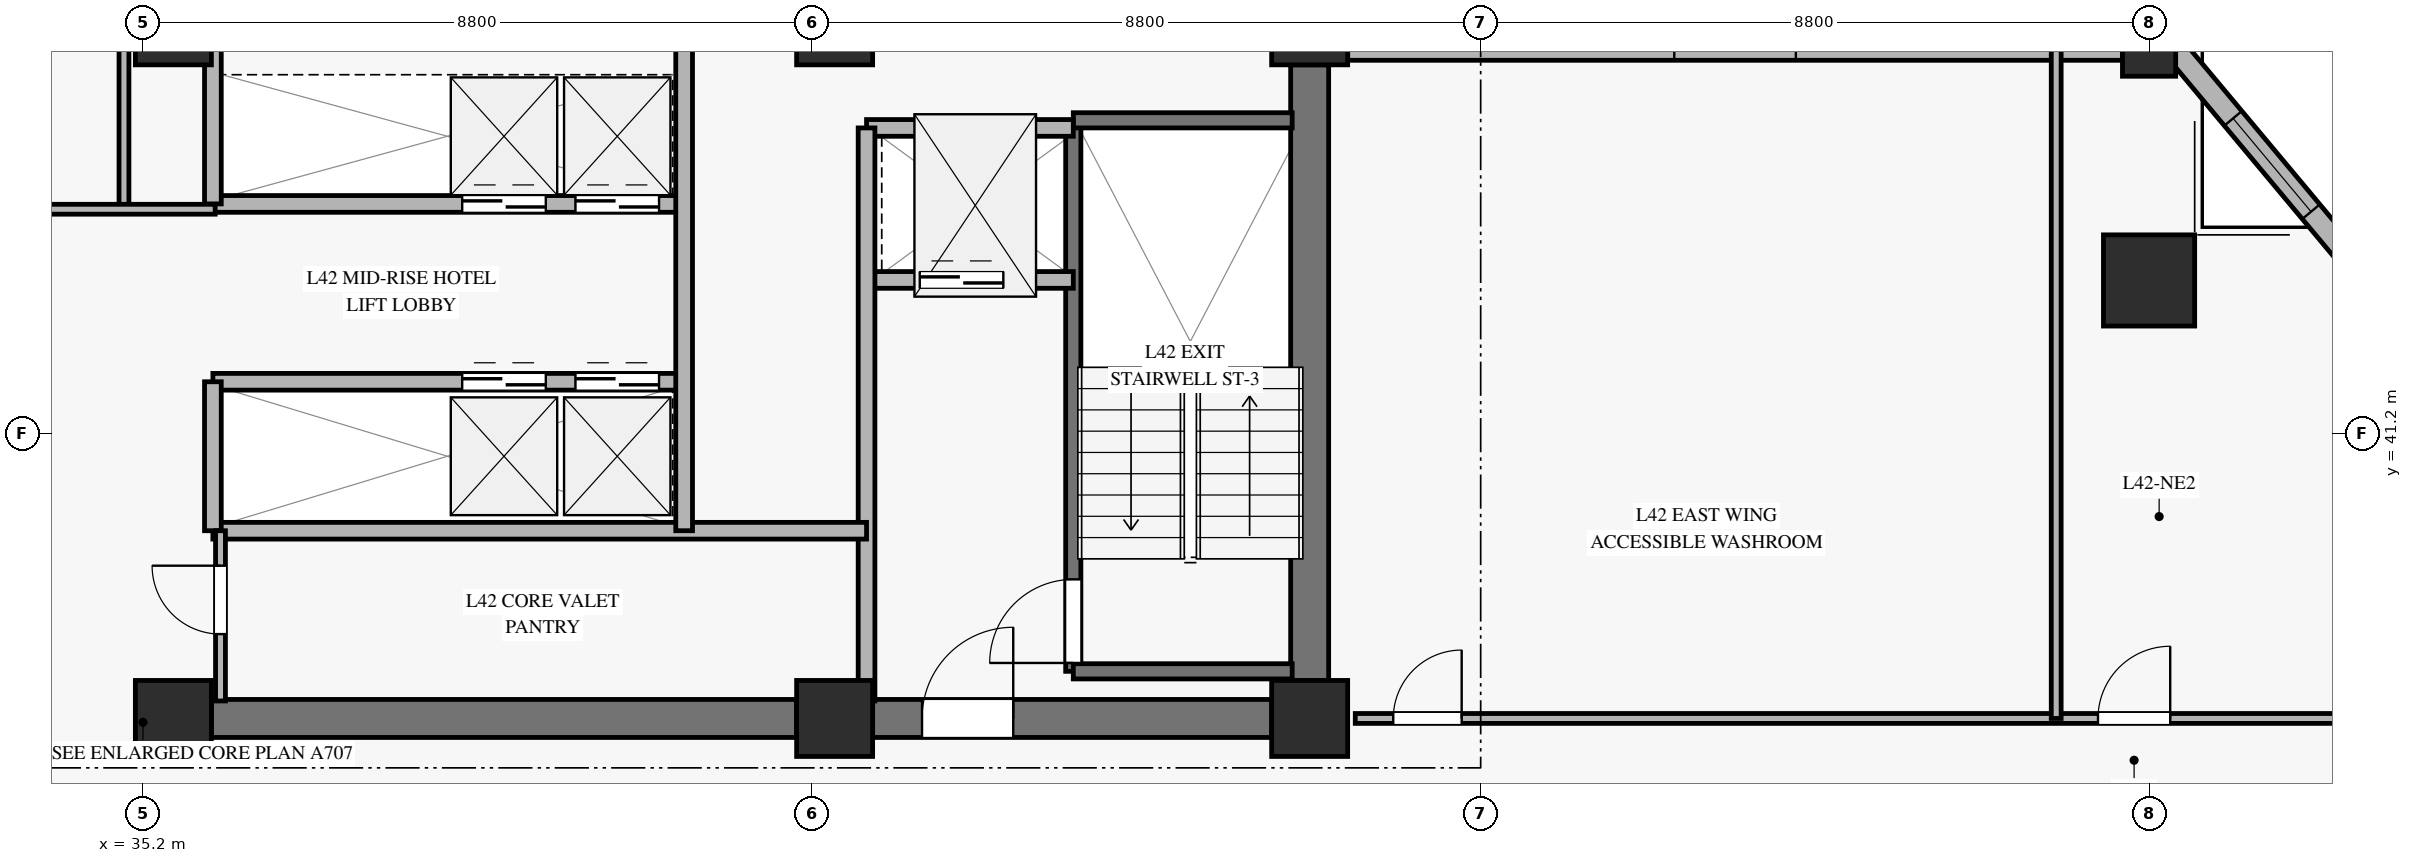
"""IFC4 building model, lengths in metres.
Left out: names, types, materials, properties, quantities, classifications, styles, units other than length and angle.
Written with IfcOpenShell. Run it as: python <this file> out.ifc"""

import sys

from ifc_helpers import new_model, si_unit, direction, frame, frame_2d, origin, origin_2d, place, context, subcontext, project, spatial, rectangle, hollow_rectangle, extrude, source, transform, mapped, element, fill, save


model = new_model("IFC4")
c1 = context("Model", 3, precision=1e-05, world=origin(), true_north=direction((0.0, 1.0)))
c2 = subcontext(c1, "Body", "Model", "MODEL_VIEW")
j1 = project(units=[si_unit("LENGTHUNIT", "METRE"), si_unit("PLANEANGLEUNIT", "RADIAN")], contexts=[c1])
p1 = place(None, origin())
s1 = spatial("IfcSite", under=j1, at=p1, CompositionType="ELEMENT")
p2 = place(p1, origin())
s2 = spatial("IfcBuilding", under=s1, at=p2, CompositionType="ELEMENT")
p3 = place(p2, frame((0.0, 0.0, 170.2)))
s3 = spatial("IfcBuildingStorey", under=s2, at=p3, CompositionType="ELEMENT", Elevation=170.2)
m1 = source(origin(), c2, "Body", "SweptSolid", [
    extrude(rectangle(XDim=1.0, YDim=1.0, at=origin_2d()), origin(), (0.0, 0.0, 1.0), 3.27),
])
for number, where, z_axis, x_axis in (
    (1, (35.6, 37.45, 0.0), (0.0, 0.0, 1.0), (1.0, 0.0, 0.0)),
    (2, (35.6, 46.55, 0.0), (0.0, 0.0, 1.0), (1.0, 0.0, 0.0)),
    (3, (44.3, 37.45, 0.0), (0.0, 0.0, 1.0), (1.0, 0.0, 0.0)),
    (4, (44.3, 46.55, 0.0), (0.0, 0.0, 1.0), (1.0, 0.0, 0.0)),
    (5, (50.55, 37.45, 0.0), (0.0, 0.0, 1.0), (1.0, 0.0, 0.0)),
    (6, (50.55, 46.55, 0.0), (0.0, 0.0, 1.0), (1.0, 0.0, 0.0)),
):
    element("IfcColumn", number, at=place(p3, frame(where, z_axis=z_axis, x_axis=x_axis)), inside=s3, PredefinedType="PILASTER", context=c2, shape_type="MappedRepresentation", body=[
        mapped(m1, transform((0.0, 0.0, 0.0), x_axis=(1.0, 0.0, 0.0), y_axis=(0.0, 1.0, 0.0), z_axis=(0.0, 0.0, 1.0), scale=1.0)),
    ])
p4 = place(p3, frame((36.1, 37.45, 0.0), z_axis=(0.0, 0.0, 1.0), x_axis=(1.0, 0.0, 0.0)))
e7 = element("IfcWall", 7, at=p4, inside=s3, PredefinedType="SHEAR", context=c2, shape_type="SweptSolid", body=[
    extrude(rectangle(XDim=7.7, YDim=0.5, at=frame_2d((3.85, 0.0))), origin(), (0.0, 0.0, 1.0), 3.27),
])
p5 = place(p3, frame((44.8, 37.45, 0.0), z_axis=(0.0, 0.0, 1.0), x_axis=(1.0, 0.0, 0.0)))
e8 = element("IfcWall", 8, at=p5, inside=s3, PredefinedType="SHEAR", context=c2, shape_type="SweptSolid", body=[
    extrude(rectangle(XDim=5.25, YDim=0.5, at=frame_2d((2.625, 0.0))), origin(), (0.0, 0.0, 1.0), 3.27),
])
p6 = place(p5, frame((0.65, 0.0, 0.0)))
e9 = element("IfcOpeningElement", 9, at=p6, cuts=e8, PredefinedType="OPENING", context=c2, shape_type="SweptSolid", body=[
    extrude(rectangle(XDim=1.2, YDim=2.15, at=frame_2d((0.6, 1.075))), frame((0.0, 0.26, 0.0), z_axis=(0.0, -1.0, 0.0), x_axis=(1.0, 0.0, 0.0)), (0.0, 0.0, 1.0), 0.52),
])
p7 = place(p3, frame((50.55, 37.95, 0.0), z_axis=(0.0, 0.0, 1.0), x_axis=(0.0, 1.0, 0.0)))
e10 = element("IfcWall", 10, at=p7, inside=s3, PredefinedType="SHEAR", context=c2, shape_type="SweptSolid", body=[
    extrude(rectangle(XDim=8.1, YDim=0.5, at=frame_2d((4.05, 0.0))), origin(), (0.0, 0.0, 1.0), 3.27),
])
m2 = source(origin(), c2, "Body", "SweptSolid", [
    extrude(hollow_rectangle(XDim=1.2, YDim=1.2, WallThickness=0.055, at=origin_2d()), origin(), (0.0, 0.0, 1.0), 3.27),
])
p8 = place(p3, frame((61.594, 43.213, 0.0), z_axis=(0.0, 0.0, 1.0), x_axis=(1.0, 0.0, 0.0)))
e11 = element("IfcColumn", 11, at=p8, inside=s3, PredefinedType="COLUMN", context=c2, shape_type="MappedRepresentation", body=[
    mapped(m2, transform((0.0, 0.0, 0.0), x_axis=(1.0, 0.0, 0.0), y_axis=(0.0, 1.0, 0.0), z_axis=(0.0, 0.0, 1.0), scale=1.0)),
])
m3 = source(origin(), c2, "Body", "SweptSolid", [
    extrude(hollow_rectangle(XDim=0.7, YDim=0.7, WallThickness=0.032, at=origin_2d()), origin(), (0.0, 0.0, 1.0), 3.27),
])
p9 = place(p3, frame((61.594, 46.25, 0.0), z_axis=(0.0, 0.0, 1.0), x_axis=(1.0, 0.0, 0.0)))
e12 = element("IfcColumn", 12, at=p9, inside=s3, PredefinedType="COLUMN", context=c2, shape_type="MappedRepresentation", body=[
    mapped(m3, transform((0.0, 0.0, 0.0), x_axis=(1.0, 0.0, 0.0), y_axis=(0.0, 1.0, 0.0), z_axis=(0.0, 0.0, 1.0), scale=1.0)),
])
p10 = place(p3, frame((51.05, 46.25, 0.0), z_axis=(0.0, 0.0, 1.0), x_axis=(1.0, 0.0, 0.0)))
e13 = element("IfcWall", 13, at=p10, inside=s3, PredefinedType="SOLIDWALL", context=c2, shape_type="SweptSolid", body=[
    extrude(rectangle(XDim=10.194, YDim=0.28, at=frame_2d((5.097, 0.0))), origin(), (0.0, 0.0, 1.0), 2.75),
])
p11 = place(p10, frame((4.297, 0.0, 0.45)))
e14 = element("IfcOpeningElement", 14, at=p11, cuts=e13, PredefinedType="OPENING", context=c2, shape_type="SweptSolid", body=[
    extrude(rectangle(XDim=1.6, YDim=2.0, at=frame_2d((0.8, 1.0))), frame((0.0, 0.15, 0.0), z_axis=(0.0, -1.0, 0.0), x_axis=(1.0, 0.0, 0.0)), (0.0, 0.0, 1.0), 0.3),
])
p12 = place(p3, frame((64.481, 43.213, 0.0), z_axis=(0.0, 0.0, 1.0), x_axis=(-0.641069950716, 0.767482454711, 0.0)))
e15 = element("IfcWall", 15, at=p12, inside=s3, PredefinedType="SOLIDWALL", context=c2, shape_type="SweptSolid", body=[
    extrude(rectangle(XDim=3.957, YDim=0.3, at=frame_2d((1.979, 0.0))), origin(), (0.0, 0.0, 1.0), 2.75),
])
p13 = place(p12, frame((1.179, 0.0, 0.45)))
e16 = element("IfcOpeningElement", 16, at=p13, cuts=e15, PredefinedType="OPENING", context=c2, shape_type="SweptSolid", body=[
    extrude(rectangle(XDim=1.6, YDim=2.0, at=frame_2d((0.8, 1.0))), frame((0.0, 0.16, 0.0), z_axis=(0.0, -1.0, 0.0), x_axis=(1.0, 0.0, 0.0)), (0.0, 0.0, 1.0), 0.32),
])
p14 = place(p3, frame((47.44, 38.07, 0.0), z_axis=(0.0, 0.0, 1.0), x_axis=(0.0, 1.0, 0.0)))
e17 = element("IfcWall", 17, at=p14, inside=s3, PredefinedType="SOLIDWALL", context=c2, shape_type="SweptSolid", body=[
    extrude(rectangle(XDim=7.25, YDim=0.2, at=frame_2d((3.625, 0.0))), origin(), (0.0, 0.0, 1.0), 3.5),
])
p15 = place(p14, frame((0.11, 0.0, 0.0)))
e18 = element("IfcOpeningElement", 18, at=p15, cuts=e17, PredefinedType="OPENING", context=c2, shape_type="SweptSolid", body=[
    extrude(rectangle(XDim=1.1, YDim=2.15, at=frame_2d((0.55, 1.075))), frame((0.0, 0.11, 0.0), z_axis=(0.0, -1.0, 0.0), x_axis=(1.0, 0.0, 0.0)), (0.0, 0.0, 1.0), 0.22),
])
for number, where, z_axis, x_axis in (
    (19, (47.44, 45.32, 0.0), (0.0, 0.0, 1.0), (1.0, 0.0, 0.0)),
    (20, (47.44, 38.07, 0.0), (0.0, 0.0, 1.0), (1.0, 0.0, 0.0)),
):
    element("IfcWall", number, at=place(p3, frame(where, z_axis=z_axis, x_axis=x_axis)), inside=s3, PredefinedType="SOLIDWALL", context=c2, shape_type="SweptSolid", body=[
        extrude(rectangle(XDim=2.88, YDim=0.2, at=frame_2d((1.44, 0.0))), origin(), (0.0, 0.0, 1.0), 3.5),
    ])
p16 = place(p3, frame((44.72, 43.22, 0.0), z_axis=(0.0, 0.0, 1.0), x_axis=(1.0, 0.0, 0.0)))
e21 = element("IfcWall", 21, at=p16, inside=s3, PredefinedType="SOLIDWALL", context=c2, shape_type="SweptSolid", body=[
    extrude(rectangle(XDim=2.72, YDim=0.22, at=frame_2d((1.36, 0.0))), origin(), (0.0, 0.0, 1.0), 3.27),
])
p17 = place(p16, frame((0.7, 0.0, 0.0)))
e22 = element("IfcOpeningElement", 22, at=p17, cuts=e21, PredefinedType="OPENING", context=c2, shape_type="SweptSolid", body=[
    extrude(rectangle(XDim=1.1, YDim=2.2, at=frame_2d((0.55, 1.1))), frame((0.0, 0.12, 0.0), z_axis=(0.0, -1.0, 0.0), x_axis=(1.0, 0.0, 0.0)), (0.0, 0.0, 1.0), 0.24),
])
p18 = place(p3, frame((44.72, 45.22, 0.0), z_axis=(0.0, 0.0, 1.0), x_axis=(1.0, 0.0, 0.0)))
e23 = element("IfcWall", 23, at=p18, inside=s3, PredefinedType="SOLIDWALL", context=c2, shape_type="SweptSolid", body=[
    extrude(rectangle(XDim=2.72, YDim=0.22, at=frame_2d((1.36, 0.0))), origin(), (0.0, 0.0, 1.0), 3.27),
])
p19 = place(p3, frame((44.72, 37.68, 0.0), z_axis=(0.0, 0.0, 1.0), x_axis=(0.0, 1.0, 0.0)))
e24 = element("IfcWall", 24, at=p19, inside=s3, PredefinedType="SOLIDWALL", context=c2, shape_type="SweptSolid", body=[
    extrude(rectangle(XDim=7.54, YDim=0.22, at=frame_2d((3.77, 0.0))), origin(), (0.0, 0.0, 1.0), 3.27),
])
p20 = place(p3, frame((36.12, 44.22, 0.0), z_axis=(0.0, 0.0, 1.0), x_axis=(1.0, 0.0, 0.0)))
e25 = element("IfcWall", 25, at=p20, inside=s3, PredefinedType="SOLIDWALL", context=c2, shape_type="SweptSolid", body=[
    extrude(rectangle(XDim=6.2, YDim=0.22, at=frame_2d((3.1, 0.0))), origin(), (0.0, 0.0, 1.0), 3.27),
])
p21 = place(p20, frame((3.28, 0.0, 0.0)))
e26 = element("IfcOpeningElement", 26, at=p21, cuts=e25, PredefinedType="OPENING", context=c2, shape_type="SweptSolid", body=[
    extrude(rectangle(XDim=1.1, YDim=2.2, at=frame_2d((0.55, 1.1))), frame((0.0, 0.12, 0.0), z_axis=(0.0, -1.0, 0.0), x_axis=(1.0, 0.0, 0.0)), (0.0, 0.0, 1.0), 0.24),
])
p22 = place(p20, frame((4.77, 0.0, 0.0)))
e27 = element("IfcOpeningElement", 27, at=p22, cuts=e25, PredefinedType="OPENING", context=c2, shape_type="SweptSolid", body=[
    extrude(rectangle(XDim=1.1, YDim=2.2, at=frame_2d((0.55, 1.1))), frame((0.0, 0.12, 0.0), z_axis=(0.0, -1.0, 0.0), x_axis=(1.0, 0.0, 0.0)), (0.0, 0.0, 1.0), 0.24),
])
p23 = place(p3, frame((36.12, 41.88, 0.0), z_axis=(0.0, 0.0, 1.0), x_axis=(1.0, 0.0, 0.0)))
e28 = element("IfcWall", 28, at=p23, inside=s3, PredefinedType="SOLIDWALL", context=c2, shape_type="SweptSolid", body=[
    extrude(rectangle(XDim=6.2, YDim=0.22, at=frame_2d((3.1, 0.0))), origin(), (0.0, 0.0, 1.0), 3.27),
])
p24 = place(p23, frame((3.28, 0.0, 0.0)))
e29 = element("IfcOpeningElement", 29, at=p24, cuts=e28, PredefinedType="OPENING", context=c2, shape_type="SweptSolid", body=[
    extrude(rectangle(XDim=1.1, YDim=2.2, at=frame_2d((0.55, 1.1))), frame((0.0, 0.12, 0.0), z_axis=(0.0, -1.0, 0.0), x_axis=(1.0, 0.0, 0.0)), (0.0, 0.0, 1.0), 0.24),
])
p25 = place(p23, frame((4.77, 0.0, 0.0)))
e30 = element("IfcOpeningElement", 30, at=p25, cuts=e28, PredefinedType="OPENING", context=c2, shape_type="SweptSolid", body=[
    extrude(rectangle(XDim=1.1, YDim=2.2, at=frame_2d((0.55, 1.1))), frame((0.0, 0.12, 0.0), z_axis=(0.0, -1.0, 0.0), x_axis=(1.0, 0.0, 0.0)), (0.0, 0.0, 1.0), 0.24),
])
p26 = place(p3, frame((36.12, 39.92, 0.0), z_axis=(0.0, 0.0, 1.0), x_axis=(1.0, 0.0, 0.0)))
e31 = element("IfcWall", 31, at=p26, inside=s3, PredefinedType="SOLIDWALL", context=c2, shape_type="SweptSolid", body=[
    extrude(rectangle(XDim=8.6, YDim=0.22, at=frame_2d((4.3, 0.0))), origin(), (0.0, 0.0, 1.0), 2.555),
])
p27 = place(p3, frame((42.32, 39.92, 0.0), z_axis=(0.0, 0.0, 1.0), x_axis=(0.0, 1.0, 0.0)))
e32 = element("IfcWall", 32, at=p27, inside=s3, PredefinedType="SOLIDWALL", context=c2, shape_type="SweptSolid", body=[
    extrude(rectangle(XDim=6.4, YDim=0.22, at=frame_2d((3.2, 0.0))), origin(), (0.0, 0.0, 1.0), 3.27),
])
p28 = place(p3, frame((36.12, 39.92, 0.0), z_axis=(0.0, 0.0, 1.0), x_axis=(0.0, 1.0, 0.0)))
e33 = element("IfcWall", 33, at=p28, inside=s3, PredefinedType="SOLIDWALL", context=c2, shape_type="SweptSolid", body=[
    extrude(rectangle(XDim=1.96, YDim=0.22, at=frame_2d((0.98, 0.0))), origin(), (0.0, 0.0, 1.0), 3.27),
])
p29 = place(p3, frame((36.12, 44.22, 0.0), z_axis=(0.0, 0.0, 1.0), x_axis=(0.0, 1.0, 0.0)))
e34 = element("IfcWall", 34, at=p29, inside=s3, PredefinedType="SOLIDWALL", context=c2, shape_type="SweptSolid", body=[
    extrude(rectangle(XDim=2.1, YDim=0.22, at=frame_2d((1.05, 0.0))), origin(), (0.0, 0.0, 1.0), 3.27),
])
p30 = place(p3, frame((34.95, 44.15, 0.0), z_axis=(0.0, 0.0, 1.0), x_axis=(0.0, 1.0, 0.0)))
e35 = element("IfcWall", 35, at=p30, inside=s3, PredefinedType="PARTITIONING", context=c2, shape_type="SweptSolid", body=[
    extrude(rectangle(XDim=2.17, YDim=0.13, at=frame_2d((1.085, 0.0))), origin(), (0.0, 0.0, 1.0), 3.27),
])
p31 = place(p3, frame((33.18, 44.15, 0.0), z_axis=(0.0, 0.0, 1.0), x_axis=(1.0, 0.0, 0.0)))
e36 = element("IfcWall", 36, at=p31, inside=s3, PredefinedType="PARTITIONING", context=c2, shape_type="SweptSolid", body=[
    extrude(rectangle(XDim=2.97, YDim=0.13, at=frame_2d((1.485, 0.0))), origin(), (0.0, 0.0, 1.0), 2.555),
])
p32 = place(p3, frame((36.22, 37.68, 0.0), z_axis=(0.0, 0.0, 1.0), x_axis=(0.0, 1.0, 0.0)))
e37 = element("IfcWall", 37, at=p32, inside=s3, PredefinedType="PARTITIONING", context=c2, shape_type="SweptSolid", body=[
    extrude(rectangle(XDim=2.24, YDim=0.13, at=frame_2d((1.12, 0.0))), origin(), (0.0, 0.0, 1.0), 3.27),
])
p33 = place(p32, frame((0.88, 0.0, 0.0)))
e38 = element("IfcOpeningElement", 38, at=p33, cuts=e37, PredefinedType="OPENING", context=c2, shape_type="SweptSolid", body=[
    extrude(rectangle(XDim=0.9, YDim=2.1, at=frame_2d((0.45, 1.05))), frame((0.0, 0.075, 0.0), z_axis=(0.0, -1.0, 0.0), x_axis=(1.0, 0.0, 0.0)), (0.0, 0.0, 1.0), 0.15),
])
p34 = place(p3, frame((51.15, 37.45, 0.0), z_axis=(0.0, 0.0, 1.0), x_axis=(1.0, 0.0, 0.0)))
e39 = element("IfcWall", 39, at=p34, inside=s3, PredefinedType="PARTITIONING", context=c2, shape_type="SweptSolid", body=[
    extrude(rectangle(XDim=13.331, YDim=0.13, at=frame_2d((6.666, 0.0))), origin(), (0.0, 0.0, 1.0), 2.755),
])
p35 = place(p34, frame((0.5, 0.0, 0.0)))
e40 = element("IfcOpeningElement", 40, at=p35, cuts=e39, PredefinedType="OPENING", context=c2, shape_type="SweptSolid", body=[
    extrude(rectangle(XDim=0.9, YDim=2.1, at=frame_2d((0.45, 1.05))), frame((0.0, 0.075, 0.0), z_axis=(0.0, -1.0, 0.0), x_axis=(1.0, 0.0, 0.0)), (0.0, 0.0, 1.0), 0.15),
])
p36 = place(p34, frame((9.772, 0.0, 0.0)))
e41 = element("IfcOpeningElement", 41, at=p36, cuts=e39, PredefinedType="OPENING", context=c2, shape_type="SweptSolid", body=[
    extrude(rectangle(XDim=0.95, YDim=2.1, at=frame_2d((0.475, 1.05))), frame((0.0, 0.075, 0.0), z_axis=(0.0, -1.0, 0.0), x_axis=(1.0, 0.0, 0.0)), (0.0, 0.0, 1.0), 0.15),
])
p37 = place(p3, frame((60.372, 37.45, 0.0), z_axis=(0.0, 0.0, 1.0), x_axis=(0.0, 1.0, 0.0)))
e42 = element("IfcWall", 42, at=p37, inside=s3, PredefinedType="PARTITIONING", context=c2, shape_type="SweptSolid", body=[
    extrude(rectangle(XDim=8.8, YDim=0.13, at=frame_2d((4.4, 0.0))), origin(), (0.0, 0.0, 1.0), 3.27),
])
m4 = source(origin(), c2, "Body", "SweptSolid", [
    extrude(rectangle(XDim=1.6, YDim=2.0, at=frame_2d((0.8, 1.0))), frame((0.0, 0.03, 0.0), z_axis=(0.0, -1.0, 0.0), x_axis=(1.0, 0.0, 0.0)), (0.0, 0.0, 1.0), 0.06),
])
p38 = place(p13, origin())
e43 = element("IfcWindow", 43, at=p38, inside=s3, PartitioningType="SINGLE_PANEL", PredefinedType="WINDOW", context=c2, shape_type="MappedRepresentation", body=[
    mapped(m4, transform((0.0, 0.0, 0.0), x_axis=(1.0, 0.0, 0.0), y_axis=(0.0, 1.0, 0.0), z_axis=(0.0, 0.0, 1.0), scale=1.0)),
])
fill(e16, e43)
m5 = source(origin(), c2, "Body", "SweptSolid", [
    extrude(rectangle(XDim=1.1, YDim=2.15, at=frame_2d((0.55, 1.075))), frame((0.0, 0.025, 0.0), z_axis=(0.0, -1.0, 0.0), x_axis=(1.0, 0.0, 0.0)), (0.0, 0.0, 1.0), 0.05),
])
p39 = place(p15, origin())
e44 = element("IfcDoor", 44, at=p39, inside=s3, OperationType="SINGLE_SWING_LEFT", PredefinedType="DOOR", context=c2, shape_type="MappedRepresentation", body=[
    mapped(m5, transform((0.0, 0.0, 0.0), x_axis=(1.0, 0.0, 0.0), y_axis=(0.0, 1.0, 0.0), z_axis=(0.0, 0.0, 1.0), scale=1.0)),
])
fill(e18, e44)
m6 = source(origin(), c2, "Body", "SweptSolid", [
    extrude(rectangle(XDim=1.1, YDim=2.2, at=frame_2d((0.55, 1.1))), frame((0.0, 0.025, 0.0), z_axis=(0.0, -1.0, 0.0), x_axis=(1.0, 0.0, 0.0)), (0.0, 0.0, 1.0), 0.05),
])
p40 = place(p17, origin())
e45 = element("IfcDoor", 45, at=p40, inside=s3, OperationType="SLIDING_TO_LEFT", PredefinedType="DOOR", context=c2, shape_type="MappedRepresentation", body=[
    mapped(m6, transform((0.0, 0.0, 0.0), x_axis=(1.0, 0.0, 0.0), y_axis=(0.0, 1.0, 0.0), z_axis=(0.0, 0.0, 1.0), scale=1.0)),
])
fill(e22, e45)
m7 = source(origin(), c2, "Body", "SweptSolid", [
    extrude(rectangle(XDim=1.2, YDim=2.15, at=frame_2d((0.6, 1.075))), frame((0.0, 0.025, 0.0), z_axis=(0.0, -1.0, 0.0), x_axis=(1.0, 0.0, 0.0)), (0.0, 0.0, 1.0), 0.05),
])
p41 = place(p6, origin())
e46 = element("IfcDoor", 46, at=p41, inside=s3, OperationType="SINGLE_SWING_RIGHT", PredefinedType="DOOR", context=c2, shape_type="MappedRepresentation", body=[
    mapped(m7, transform((0.0, 0.0, 0.0), x_axis=(1.0, 0.0, 0.0), y_axis=(0.0, 1.0, 0.0), z_axis=(0.0, 0.0, 1.0), scale=1.0)),
])
fill(e9, e46)
p42 = place(p21, origin())
e47 = element("IfcDoor", 47, at=p42, inside=s3, OperationType="SLIDING_TO_LEFT", PredefinedType="DOOR", context=c2, shape_type="MappedRepresentation", body=[
    mapped(m6, transform((0.0, 0.0, 0.0), x_axis=(1.0, 0.0, 0.0), y_axis=(0.0, 1.0, 0.0), z_axis=(0.0, 0.0, 1.0), scale=1.0)),
])
fill(e26, e47)
p43 = place(p22, origin())
e48 = element("IfcDoor", 48, at=p43, inside=s3, OperationType="SLIDING_TO_LEFT", PredefinedType="DOOR", context=c2, shape_type="MappedRepresentation", body=[
    mapped(m6, transform((0.0, 0.0, 0.0), x_axis=(1.0, 0.0, 0.0), y_axis=(0.0, 1.0, 0.0), z_axis=(0.0, 0.0, 1.0), scale=1.0)),
])
fill(e27, e48)
p44 = place(p24, origin())
e49 = element("IfcDoor", 49, at=p44, inside=s3, OperationType="SLIDING_TO_LEFT", PredefinedType="DOOR", context=c2, shape_type="MappedRepresentation", body=[
    mapped(m6, transform((0.0, 0.0, 0.0), x_axis=(1.0, 0.0, 0.0), y_axis=(0.0, 1.0, 0.0), z_axis=(0.0, 0.0, 1.0), scale=1.0)),
])
fill(e29, e49)
p45 = place(p25, origin())
e50 = element("IfcDoor", 50, at=p45, inside=s3, OperationType="SLIDING_TO_LEFT", PredefinedType="DOOR", context=c2, shape_type="MappedRepresentation", body=[
    mapped(m6, transform((0.0, 0.0, 0.0), x_axis=(1.0, 0.0, 0.0), y_axis=(0.0, 1.0, 0.0), z_axis=(0.0, 0.0, 1.0), scale=1.0)),
])
fill(e30, e50)
m8 = source(origin(), c2, "Body", "SweptSolid", [
    extrude(rectangle(XDim=0.9, YDim=2.1, at=frame_2d((0.45, 1.05))), frame((0.0, 0.025, 0.0), z_axis=(0.0, -1.0, 0.0), x_axis=(1.0, 0.0, 0.0)), (0.0, 0.0, 1.0), 0.05),
])
p46 = place(p33, origin())
e51 = element("IfcDoor", 51, at=p46, inside=s3, OperationType="SINGLE_SWING_RIGHT", PredefinedType="DOOR", context=c2, shape_type="MappedRepresentation", body=[
    mapped(m8, transform((0.0, 0.0, 0.0), x_axis=(1.0, 0.0, 0.0), y_axis=(0.0, 1.0, 0.0), z_axis=(0.0, 0.0, 1.0), scale=1.0)),
])
fill(e38, e51)
p47 = place(p35, origin())
e52 = element("IfcDoor", 52, at=p47, inside=s3, OperationType="SINGLE_SWING_RIGHT", PredefinedType="DOOR", context=c2, shape_type="MappedRepresentation", body=[
    mapped(m8, transform((0.0, 0.0, 0.0), x_axis=(1.0, 0.0, 0.0), y_axis=(0.0, 1.0, 0.0), z_axis=(0.0, 0.0, 1.0), scale=1.0)),
])
fill(e40, e52)
m9 = source(origin(), c2, "Body", "SweptSolid", [
    extrude(rectangle(XDim=0.95, YDim=2.1, at=frame_2d((0.475, 1.05))), frame((0.0, 0.025, 0.0), z_axis=(0.0, -1.0, 0.0), x_axis=(1.0, 0.0, 0.0)), (0.0, 0.0, 1.0), 0.05),
])
p48 = place(p36, origin())
e53 = element("IfcDoor", 53, at=p48, inside=s3, OperationType="SINGLE_SWING_RIGHT", PredefinedType="DOOR", context=c2, shape_type="MappedRepresentation", body=[
    mapped(m9, transform((0.0, 0.0, 0.0), x_axis=(1.0, 0.0, 0.0), y_axis=(0.0, 1.0, 0.0), z_axis=(0.0, 0.0, 1.0), scale=1.0)),
])
fill(e41, e53)
save(model, sys.argv[1])
